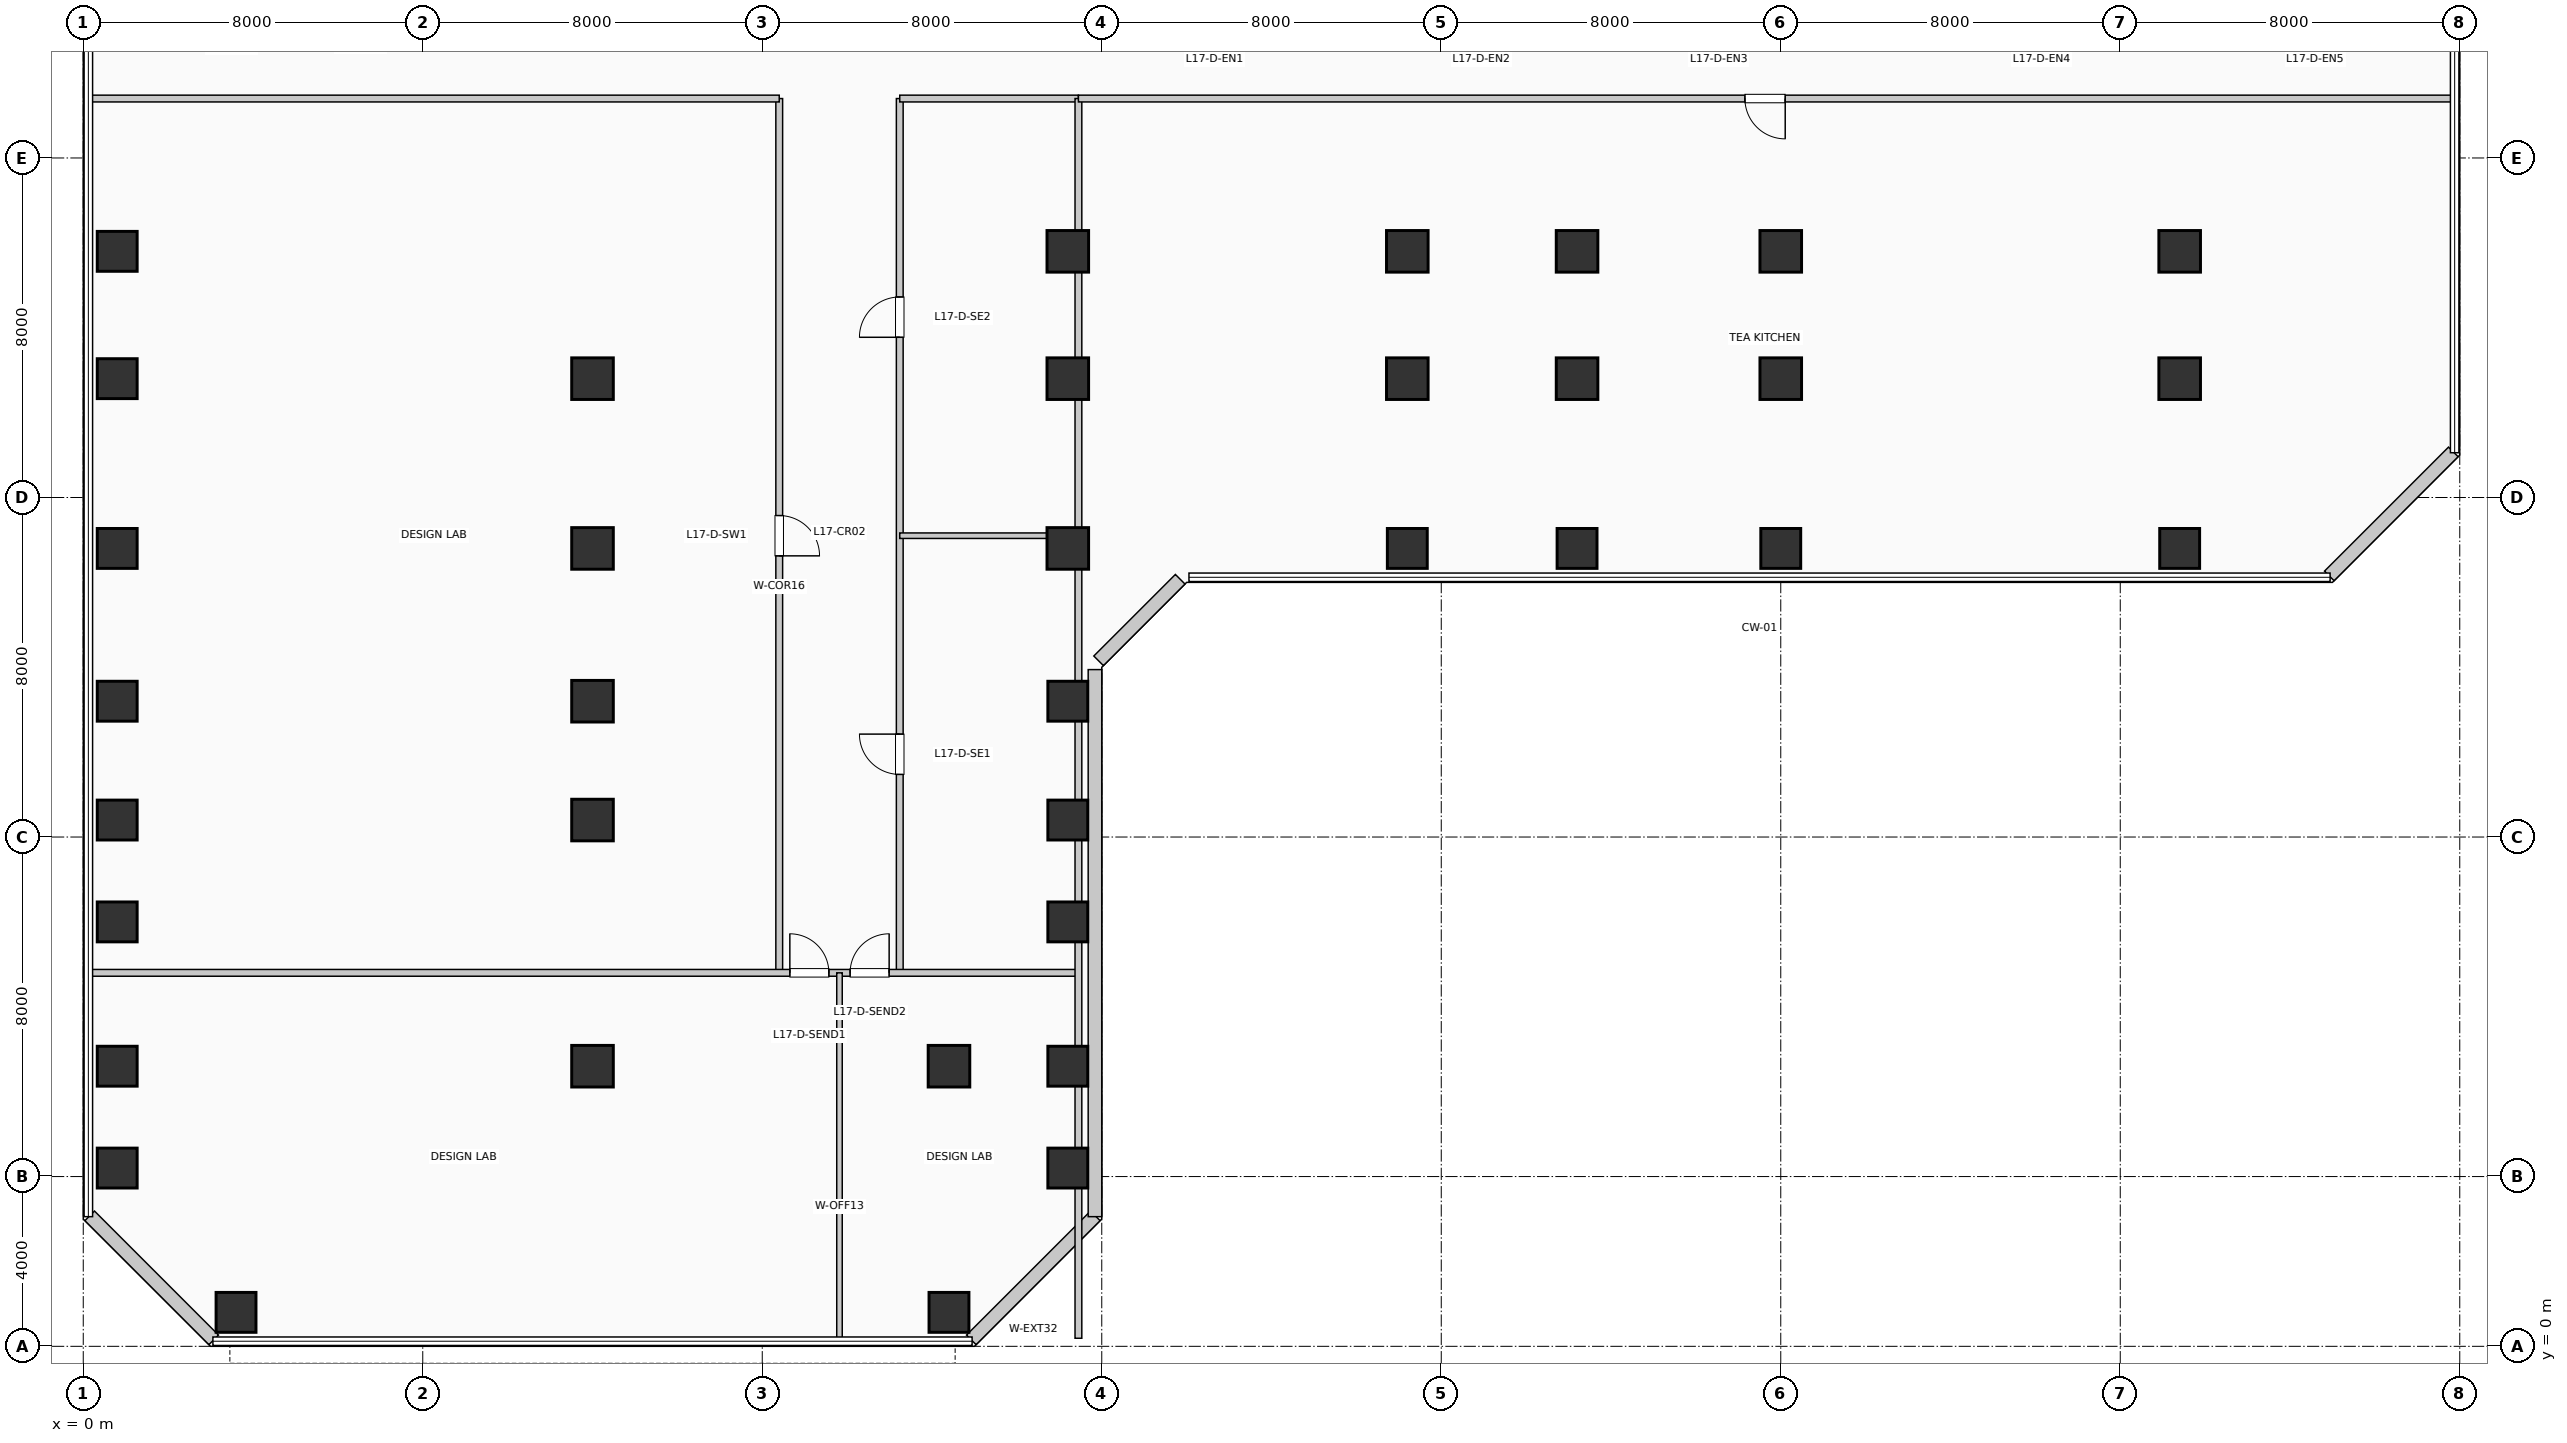
"""IFC4 building model, lengths in metres.
Left out: names, types, materials, properties, quantities, classifications, styles, units other than length and angle.
Written with IfcOpenShell. Run it as: python <this file> out.ifc"""

import sys

from ifc_helpers import new_model, si_unit, direction, frame, frame_2d, origin, origin_2d, place, context, subcontext, project, spatial, rectangle, extrude, element, fill, save


model = new_model("IFC4")
c1 = context("Model", 3, precision=1e-05, world=origin(), true_north=direction((0.0, 1.0)))
c2 = subcontext(c1, "Body", "Model", "MODEL_VIEW")
j1 = project(units=[si_unit("LENGTHUNIT", "METRE"), si_unit("PLANEANGLEUNIT", "RADIAN")], contexts=[c1])
p1 = place(None, origin())
s1 = spatial("IfcSite", under=j1, at=p1, CompositionType="ELEMENT")
p2 = place(p1, origin())
s2 = spatial("IfcBuilding", under=s1, at=p2, CompositionType="ELEMENT")
p3 = place(p2, frame((0.0, 0.0, 73.92)))
s3 = spatial("IfcBuildingStorey", under=s2, at=p3, CompositionType="ELEMENT", Elevation=73.92)
for number, where, z_axis, x_axis in (
    (1, (0.8, 4.2, 0.0), (0.0, 0.0, 1.0), (1.0, 0.0, 0.0)),
    (2, (0.8, 6.6, 0.0), (0.0, 0.0, 1.0), (1.0, 0.0, 0.0)),
    (3, (0.8, 10.0, 0.0), (0.0, 0.0, 1.0), (1.0, 0.0, 0.0)),
    (4, (0.8, 12.4, 0.0), (0.0, 0.0, 1.0), (1.0, 0.0, 0.0)),
    (5, (0.8, 15.2, 0.0), (0.0, 0.0, 1.0), (1.0, 0.0, 0.0)),
    (6, (0.8, 18.8, 0.0), (0.0, 0.0, 1.0), (1.0, 0.0, 0.0)),
    (7, (0.8, 22.8, 0.0), (0.0, 0.0, 1.0), (1.0, 0.0, 0.0)),
    (8, (0.8, 25.8, 0.0), (0.0, 0.0, 1.0), (1.0, 0.0, 0.0)),
    (9, (3.6, 0.8, 0.0), (0.0, 0.0, 1.0), (1.0, 0.0, 0.0)),
):
    element("IfcColumn", number, at=place(p3, frame(where, z_axis=z_axis, x_axis=x_axis)), inside=s3, PredefinedType="COLUMN", context=c2, shape_type="SweptSolid", body=[
        extrude(rectangle(XDim=0.94, YDim=0.94, at=origin_2d()), origin(), (0.0, 0.0, 1.0), 3.96),
    ])
for number, where, z_axis, x_axis in (
    (10, (12.0, 6.6, 0.0), (0.0, 0.0, 1.0), (1.0, 0.0, 0.0)),
    (11, (12.0, 12.4, 0.0), (0.0, 0.0, 1.0), (1.0, 0.0, 0.0)),
    (12, (12.0, 15.2, 0.0), (0.0, 0.0, 1.0), (1.0, 0.0, 0.0)),
    (13, (12.0, 18.8, 0.0), (0.0, 0.0, 1.0), (1.0, 0.0, 0.0)),
    (14, (12.0, 22.8, 0.0), (0.0, 0.0, 1.0), (1.0, 0.0, 0.0)),
):
    element("IfcColumn", number, at=place(p3, frame(where, z_axis=z_axis, x_axis=x_axis)), inside=s3, PredefinedType="COLUMN", context=c2, shape_type="SweptSolid", body=[
        extrude(rectangle(XDim=0.98, YDim=0.98, at=origin_2d()), origin(), (0.0, 0.0, 1.0), 3.96),
    ])
p4 = place(p3, frame((20.4, 0.8, 0.0), z_axis=(0.0, 0.0, 1.0), x_axis=(1.0, 0.0, 0.0)))
e15 = element("IfcColumn", 15, at=p4, inside=s3, PredefinedType="COLUMN", context=c2, shape_type="SweptSolid", body=[
    extrude(rectangle(XDim=0.94, YDim=0.94, at=origin_2d()), origin(), (0.0, 0.0, 1.0), 3.96),
])
p5 = place(p3, frame((20.4, 6.6, 0.0), z_axis=(0.0, 0.0, 1.0), x_axis=(1.0, 0.0, 0.0)))
e16 = element("IfcColumn", 16, at=p5, inside=s3, PredefinedType="COLUMN", context=c2, shape_type="SweptSolid", body=[
    extrude(rectangle(XDim=0.98, YDim=0.98, at=origin_2d()), origin(), (0.0, 0.0, 1.0), 3.96),
])
for number, where, z_axis, x_axis in (
    (17, (23.2, 4.2, 0.0), (0.0, 0.0, 1.0), (1.0, 0.0, 0.0)),
    (18, (23.2, 6.6, 0.0), (0.0, 0.0, 1.0), (1.0, 0.0, 0.0)),
    (19, (23.2, 10.0, 0.0), (0.0, 0.0, 1.0), (1.0, 0.0, 0.0)),
    (20, (23.2, 12.4, 0.0), (0.0, 0.0, 1.0), (1.0, 0.0, 0.0)),
    (21, (23.2, 15.2, 0.0), (0.0, 0.0, 1.0), (1.0, 0.0, 0.0)),
):
    element("IfcColumn", number, at=place(p3, frame(where, z_axis=z_axis, x_axis=x_axis)), inside=s3, PredefinedType="COLUMN", context=c2, shape_type="SweptSolid", body=[
        extrude(rectangle(XDim=0.94, YDim=0.94, at=origin_2d()), origin(), (0.0, 0.0, 1.0), 3.96),
    ])
for number, where, z_axis, x_axis in (
    (22, (23.2, 18.8, 0.0), (0.0, 0.0, 1.0), (1.0, 0.0, 0.0)),
    (23, (23.2, 22.8, 0.0), (0.0, 0.0, 1.0), (1.0, 0.0, 0.0)),
    (24, (23.2, 25.8, 0.0), (0.0, 0.0, 1.0), (1.0, 0.0, 0.0)),
):
    element("IfcColumn", number, at=place(p3, frame(where, z_axis=z_axis, x_axis=x_axis)), inside=s3, PredefinedType="COLUMN", context=c2, shape_type="SweptSolid", body=[
        extrude(rectangle(XDim=0.98, YDim=0.98, at=origin_2d()), origin(), (0.0, 0.0, 1.0), 3.96),
    ])
p6 = place(p3, frame((31.2, 18.8, 0.0), z_axis=(0.0, 0.0, 1.0), x_axis=(1.0, 0.0, 0.0)))
e25 = element("IfcColumn", 25, at=p6, inside=s3, PredefinedType="COLUMN", context=c2, shape_type="SweptSolid", body=[
    extrude(rectangle(XDim=0.94, YDim=0.94, at=origin_2d()), origin(), (0.0, 0.0, 1.0), 3.96),
])
for number, where, z_axis, x_axis in (
    (26, (31.2, 22.8, 0.0), (0.0, 0.0, 1.0), (1.0, 0.0, 0.0)),
    (27, (31.2, 25.8, 0.0), (0.0, 0.0, 1.0), (1.0, 0.0, 0.0)),
):
    element("IfcColumn", number, at=place(p3, frame(where, z_axis=z_axis, x_axis=x_axis)), inside=s3, PredefinedType="COLUMN", context=c2, shape_type="SweptSolid", body=[
        extrude(rectangle(XDim=0.98, YDim=0.98, at=origin_2d()), origin(), (0.0, 0.0, 1.0), 3.96),
    ])
p7 = place(p3, frame((35.2, 18.8, 0.0), z_axis=(0.0, 0.0, 1.0), x_axis=(1.0, 0.0, 0.0)))
e28 = element("IfcColumn", 28, at=p7, inside=s3, PredefinedType="COLUMN", context=c2, shape_type="SweptSolid", body=[
    extrude(rectangle(XDim=0.94, YDim=0.94, at=origin_2d()), origin(), (0.0, 0.0, 1.0), 3.96),
])
for number, where, z_axis, x_axis in (
    (29, (35.2, 22.8, 0.0), (0.0, 0.0, 1.0), (1.0, 0.0, 0.0)),
    (30, (35.2, 25.8, 0.0), (0.0, 0.0, 1.0), (1.0, 0.0, 0.0)),
):
    element("IfcColumn", number, at=place(p3, frame(where, z_axis=z_axis, x_axis=x_axis)), inside=s3, PredefinedType="COLUMN", context=c2, shape_type="SweptSolid", body=[
        extrude(rectangle(XDim=0.98, YDim=0.98, at=origin_2d()), origin(), (0.0, 0.0, 1.0), 3.96),
    ])
p8 = place(p3, frame((40.0, 18.8, 0.0), z_axis=(0.0, 0.0, 1.0), x_axis=(1.0, 0.0, 0.0)))
e31 = element("IfcColumn", 31, at=p8, inside=s3, PredefinedType="COLUMN", context=c2, shape_type="SweptSolid", body=[
    extrude(rectangle(XDim=0.94, YDim=0.94, at=origin_2d()), origin(), (0.0, 0.0, 1.0), 3.96),
])
for number, where, z_axis, x_axis in (
    (32, (40.0, 22.8, 0.0), (0.0, 0.0, 1.0), (1.0, 0.0, 0.0)),
    (33, (40.0, 25.8, 0.0), (0.0, 0.0, 1.0), (1.0, 0.0, 0.0)),
):
    element("IfcColumn", number, at=place(p3, frame(where, z_axis=z_axis, x_axis=x_axis)), inside=s3, PredefinedType="COLUMN", context=c2, shape_type="SweptSolid", body=[
        extrude(rectangle(XDim=0.98, YDim=0.98, at=origin_2d()), origin(), (0.0, 0.0, 1.0), 3.96),
    ])
p9 = place(p3, frame((49.4, 18.8, 0.0), z_axis=(0.0, 0.0, 1.0), x_axis=(1.0, 0.0, 0.0)))
e34 = element("IfcColumn", 34, at=p9, inside=s3, PredefinedType="COLUMN", context=c2, shape_type="SweptSolid", body=[
    extrude(rectangle(XDim=0.94, YDim=0.94, at=origin_2d()), origin(), (0.0, 0.0, 1.0), 3.96),
])
for number, where, z_axis, x_axis in (
    (35, (49.4, 22.8, 0.0), (0.0, 0.0, 1.0), (1.0, 0.0, 0.0)),
    (36, (49.4, 25.8, 0.0), (0.0, 0.0, 1.0), (1.0, 0.0, 0.0)),
):
    element("IfcColumn", number, at=place(p3, frame(where, z_axis=z_axis, x_axis=x_axis)), inside=s3, PredefinedType="COLUMN", context=c2, shape_type="SweptSolid", body=[
        extrude(rectangle(XDim=0.98, YDim=0.98, at=origin_2d()), origin(), (0.0, 0.0, 1.0), 3.96),
    ])
p10 = place(p3, frame((20.926, 0.152, 0.0), z_axis=(0.0, 0.0, 1.0), x_axis=(0.707106781187, 0.707106781187, 0.0)))
e37 = element("IfcWall", 37, at=p10, inside=s3, PredefinedType="SOLIDWALL", context=c2, shape_type="SweptSolid", body=[
    extrude(rectangle(XDim=4.133, YDim=0.32, at=frame_2d((2.066, 0.0))), origin(), (0.0, 0.0, 1.0), 3.71),
])
p11 = place(p3, frame((23.84, 3.055, 0.0), z_axis=(0.0, 0.0, 1.0), x_axis=(0.0, 1.0, 0.0)))
e38 = element("IfcWall", 38, at=p11, inside=s3, PredefinedType="SOLIDWALL", context=c2, shape_type="SweptSolid", body=[
    extrude(rectangle(XDim=12.89, YDim=0.32, at=frame_2d((6.445, 0.0))), origin(), (0.0, 0.0, 1.0), 3.71),
])
p12 = place(p3, frame((23.926, 16.152, 0.0), z_axis=(0.0, 0.0, 1.0), x_axis=(0.707106781187, 0.707106781187, 0.0)))
e39 = element("IfcWall", 39, at=p12, inside=s3, PredefinedType="SOLIDWALL", context=c2, shape_type="SweptSolid", body=[
    extrude(rectangle(XDim=2.718, YDim=0.32, at=frame_2d((1.359, 0.0))), origin(), (0.0, 0.0, 1.0), 3.71),
])
for number, where, z_axis, x_axis in (
    (40, (52.926, 18.152, 0.0), (0.0, 0.0, 1.0), (0.707, 0.707, 0.0)),
    (41, (0.152, 3.074, 0.0), (0.0, 0.0, 1.0), (0.707, -0.707, 0.0)),
):
    element("IfcWall", number, at=place(p3, frame(where, z_axis=z_axis, x_axis=x_axis)), inside=s3, PredefinedType="SOLIDWALL", context=c2, shape_type="SweptSolid", body=[
        extrude(rectangle(XDim=4.133, YDim=0.32, at=frame_2d((2.066, 0.0))), origin(), (0.0, 0.0, 1.0), 3.71),
    ])
p13 = place(p3, frame((16.4, 8.8, 0.0), z_axis=(0.0, 0.0, 1.0), x_axis=(0.0, 1.0, 0.0)))
e42 = element("IfcWall", 42, at=p13, inside=s3, PredefinedType="PARTITIONING", context=c2, shape_type="SweptSolid", body=[
    extrude(rectangle(XDim=20.6, YDim=0.16, at=frame_2d((10.3, 0.0))), origin(), (0.0, 0.0, 1.0), 3.71),
])
p14 = place(p13, frame((10.775, 0.0, 0.0), z_axis=(0.0, 0.0, 1.0), x_axis=(-1.0, 0.0, 0.0)))
e43 = element("IfcOpeningElement", 43, at=p14, cuts=e42, PredefinedType="OPENING", context=c2, shape_type="SweptSolid", body=[
    extrude(rectangle(XDim=0.95, YDim=2.15, at=frame_2d((0.475, 1.075))), frame((0.0, 0.09, 0.0), z_axis=(0.0, -1.0, 0.0), x_axis=(1.0, 0.0, 0.0)), (0.0, 0.0, 1.0), 0.18),
])
p15 = place(p3, frame((19.24, 8.8, 0.0), z_axis=(0.0, 0.0, 1.0), x_axis=(0.0, 1.0, 0.0)))
e44 = element("IfcWall", 44, at=p15, inside=s3, PredefinedType="PARTITIONING", context=c2, shape_type="SweptSolid", body=[
    extrude(rectangle(XDim=20.6, YDim=0.16, at=frame_2d((10.3, 0.0))), origin(), (0.0, 0.0, 1.0), 3.71),
])
p16 = place(p15, frame((4.675, 0.0, 0.0)))
e45 = element("IfcOpeningElement", 45, at=p16, cuts=e44, PredefinedType="OPENING", context=c2, shape_type="SweptSolid", body=[
    extrude(rectangle(XDim=0.95, YDim=2.15, at=frame_2d((0.475, 1.075))), frame((0.0, 0.09, 0.0), z_axis=(0.0, -1.0, 0.0), x_axis=(1.0, 0.0, 0.0)), (0.0, 0.0, 1.0), 0.18),
])
p17 = place(p15, frame((14.975, 0.0, 0.0)))
e46 = element("IfcOpeningElement", 46, at=p17, cuts=e44, PredefinedType="OPENING", context=c2, shape_type="SweptSolid", body=[
    extrude(rectangle(XDim=0.95, YDim=2.15, at=frame_2d((0.475, 1.075))), frame((0.0, 0.09, 0.0), z_axis=(0.0, -1.0, 0.0), x_axis=(1.0, 0.0, 0.0)), (0.0, 0.0, 1.0), 0.18),
])
p18 = place(p3, frame((0.19, 8.8, 0.0), z_axis=(0.0, 0.0, 1.0), x_axis=(1.0, 0.0, 0.0)))
e47 = element("IfcWall", 47, at=p18, inside=s3, PredefinedType="PARTITIONING", context=c2, shape_type="SweptSolid", body=[
    extrude(rectangle(XDim=23.26, YDim=0.16, at=frame_2d((11.63, 0.0))), origin(), (0.0, 0.0, 1.0), 3.71),
])
p19 = place(p18, frame((16.46, 0.0, 0.0)))
e48 = element("IfcOpeningElement", 48, at=p19, cuts=e47, PredefinedType="OPENING", context=c2, shape_type="SweptSolid", body=[
    extrude(rectangle(XDim=0.92, YDim=2.1, at=frame_2d((0.46, 1.05))), frame((0.0, 0.09, 0.0), z_axis=(0.0, -1.0, 0.0), x_axis=(1.0, 0.0, 0.0)), (0.0, 0.0, 1.0), 0.18),
])
p20 = place(p18, frame((17.88, 0.0, 0.0)))
e49 = element("IfcOpeningElement", 49, at=p20, cuts=e47, PredefinedType="OPENING", context=c2, shape_type="SweptSolid", body=[
    extrude(rectangle(XDim=0.92, YDim=2.1, at=frame_2d((0.46, 1.05))), frame((0.0, 0.09, 0.0), z_axis=(0.0, -1.0, 0.0), x_axis=(1.0, 0.0, 0.0)), (0.0, 0.0, 1.0), 0.18),
])
p21 = place(p3, frame((0.19, 29.4, 0.0), z_axis=(0.0, 0.0, 1.0), x_axis=(1.0, 0.0, 0.0)))
e50 = element("IfcWall", 50, at=p21, inside=s3, PredefinedType="PARTITIONING", context=c2, shape_type="SweptSolid", body=[
    extrude(rectangle(XDim=16.21, YDim=0.16, at=frame_2d((8.105, 0.0))), origin(), (0.0, 0.0, 1.0), 3.365),
])
p22 = place(p3, frame((19.24, 29.4, 0.0), z_axis=(0.0, 0.0, 1.0), x_axis=(1.0, 0.0, 0.0)))
e51 = element("IfcWall", 51, at=p22, inside=s3, PredefinedType="PARTITIONING", context=c2, shape_type="SweptSolid", body=[
    extrude(rectangle(XDim=4.21, YDim=0.16, at=frame_2d((2.105, 0.0))), origin(), (0.0, 0.0, 1.0), 3.71),
])
p23 = place(p3, frame((23.45, 0.19, 0.0), z_axis=(0.0, 0.0, 1.0), x_axis=(0.0, 1.0, 0.0)))
e52 = element("IfcWall", 52, at=p23, inside=s3, PredefinedType="PARTITIONING", context=c2, shape_type="SweptSolid", body=[
    extrude(rectangle(XDim=29.21, YDim=0.16, at=frame_2d((14.605, 0.0))), origin(), (0.0, 0.0, 1.0), 2.995),
])
p24 = place(p3, frame((17.82, 0.19, 0.0), z_axis=(0.0, 0.0, 1.0), x_axis=(0.0, 1.0, 0.0)))
e53 = element("IfcWall", 53, at=p24, inside=s3, PredefinedType="PARTITIONING", context=c2, shape_type="SweptSolid", body=[
    extrude(rectangle(XDim=8.61, YDim=0.13, at=frame_2d((4.305, 0.0))), origin(), (0.0, 0.0, 1.0), 3.71),
])
p25 = place(p3, frame((19.24, 19.1, 0.0), z_axis=(0.0, 0.0, 1.0), x_axis=(1.0, 0.0, 0.0)))
e54 = element("IfcWall", 54, at=p25, inside=s3, PredefinedType="PARTITIONING", context=c2, shape_type="SweptSolid", body=[
    extrude(rectangle(XDim=4.21, YDim=0.13, at=frame_2d((2.105, 0.0))), origin(), (0.0, 0.0, 1.0), 2.995),
])
p26 = place(p3, frame((23.45, 29.4, 0.0), z_axis=(0.0, 0.0, 1.0), x_axis=(1.0, 0.0, 0.0)))
e55 = element("IfcWall", 55, at=p26, inside=s3, PredefinedType="PARTITIONING", context=c2, shape_type="SweptSolid", body=[
    extrude(rectangle(XDim=32.36, YDim=0.16, at=frame_2d((16.18, 0.0))), origin(), (0.0, 0.0, 1.0), 3.365),
])
p27 = place(p26, frame((16.655, 0.0, 0.0), z_axis=(0.0, 0.0, 1.0), x_axis=(-1.0, 0.0, 0.0)))
e56 = element("IfcOpeningElement", 56, at=p27, cuts=e55, PredefinedType="OPENING", context=c2, shape_type="SweptSolid", body=[
    extrude(rectangle(XDim=0.95, YDim=2.15, at=frame_2d((0.475, 1.075))), frame((0.0, 0.09, 0.0), z_axis=(0.0, -1.0, 0.0), x_axis=(1.0, 0.0, 0.0)), (0.0, 0.0, 1.0), 0.18),
])
p28 = place(p19, origin())
e57 = element("IfcDoor", 57, at=p28, inside=s3, OperationType="SINGLE_SWING_LEFT", PredefinedType="DOOR", context=c2, shape_type="SweptSolid", body=[
    extrude(rectangle(XDim=0.92, YDim=2.1, at=frame_2d((0.46, 1.05))), frame((0.0, 0.025, 0.0), z_axis=(0.0, -1.0, 0.0), x_axis=(1.0, 0.0, 0.0)), (0.0, 0.0, 1.0), 0.05),
])
fill(e48, e57)
p29 = place(p20, origin())
e58 = element("IfcDoor", 58, at=p29, inside=s3, OperationType="SINGLE_SWING_RIGHT", PredefinedType="DOOR", context=c2, shape_type="SweptSolid", body=[
    extrude(rectangle(XDim=0.92, YDim=2.1, at=frame_2d((0.46, 1.05))), frame((0.0, 0.025, 0.0), z_axis=(0.0, -1.0, 0.0), x_axis=(1.0, 0.0, 0.0)), (0.0, 0.0, 1.0), 0.05),
])
fill(e49, e58)
p30 = place(p14, origin())
e59 = element("IfcDoor", 59, at=p30, inside=s3, OperationType="SINGLE_SWING_LEFT", PredefinedType="DOOR", context=c2, shape_type="SweptSolid", body=[
    extrude(rectangle(XDim=0.95, YDim=2.15, at=frame_2d((0.475, 1.075))), frame((0.0, 0.025, 0.0), z_axis=(0.0, -1.0, 0.0), x_axis=(1.0, 0.0, 0.0)), (0.0, 0.0, 1.0), 0.05),
])
fill(e43, e59)
p31 = place(p16, origin())
e60 = element("IfcDoor", 60, at=p31, inside=s3, OperationType="SINGLE_SWING_RIGHT", PredefinedType="DOOR", context=c2, shape_type="SweptSolid", body=[
    extrude(rectangle(XDim=0.95, YDim=2.15, at=frame_2d((0.475, 1.075))), frame((0.0, 0.025, 0.0), z_axis=(0.0, -1.0, 0.0), x_axis=(1.0, 0.0, 0.0)), (0.0, 0.0, 1.0), 0.05),
])
fill(e45, e60)
p32 = place(p17, origin())
e61 = element("IfcDoor", 61, at=p32, inside=s3, OperationType="SINGLE_SWING_LEFT", PredefinedType="DOOR", context=c2, shape_type="SweptSolid", body=[
    extrude(rectangle(XDim=0.95, YDim=2.15, at=frame_2d((0.475, 1.075))), frame((0.0, 0.025, 0.0), z_axis=(0.0, -1.0, 0.0), x_axis=(1.0, 0.0, 0.0)), (0.0, 0.0, 1.0), 0.05),
])
fill(e46, e61)
p33 = place(p27, origin())
e62 = element("IfcDoor", 62, at=p33, inside=s3, OperationType="SINGLE_SWING_RIGHT", PredefinedType="DOOR", context=c2, shape_type="SweptSolid", body=[
    extrude(rectangle(XDim=0.95, YDim=2.15, at=frame_2d((0.475, 1.075))), frame((0.0, 0.025, 0.0), z_axis=(0.0, -1.0, 0.0), x_axis=(1.0, 0.0, 0.0)), (0.0, 0.0, 1.0), 0.05),
])
fill(e56, e62)
save(model, sys.argv[1])
